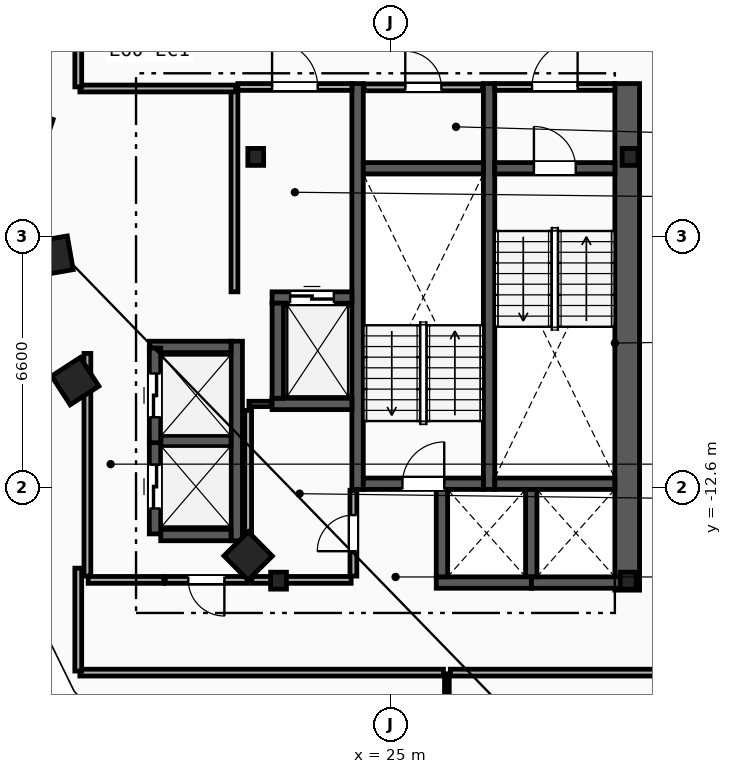
"""IFC4 building model, lengths in metres.
Left out: names, types, materials, properties, quantities, classifications, styles, units other than length and angle.
Written with IfcOpenShell. Run it as: python <this file> out.ifc"""

import sys

from ifc_helpers import new_model, si_unit, direction, frame, frame_2d, origin, origin_2d, place, context, subcontext, project, spatial, rectangle, i_section, extrude, element, fill, save


model = new_model("IFC4")
c1 = context("Model", 3, precision=1e-05, world=origin(), true_north=direction((0.0, 1.0)))
c2 = subcontext(c1, "Body", "Model", "MODEL_VIEW")
j1 = project(units=[si_unit("LENGTHUNIT", "METRE"), si_unit("PLANEANGLEUNIT", "RADIAN")], contexts=[c1])
p1 = place(None, origin())
s1 = spatial("IfcSite", under=j1, at=p1, CompositionType="ELEMENT")
p2 = place(p1, origin())
s2 = spatial("IfcBuilding", under=s1, at=p2, CompositionType="ELEMENT")
p3 = place(p2, frame((0.0, 0.0, 227.8)))
s3 = spatial("IfcBuildingStorey", under=s2, at=p3, CompositionType="ELEMENT", Elevation=227.8)
for number, where, z_axis, x_axis in (
    (1, (31.3, -3.9, 0.0), (0.0, 0.0, 1.0), (1.0, 0.0, 0.0)),
    (2, (21.45, -3.9, 0.0), (0.0, 0.0, 1.0), (1.0, 0.0, 0.0)),
    (3, (22.05, -15.05, 0.0), (0.0, 0.0, 1.0), (1.0, 0.0, 0.0)),
    (4, (31.25, -15.05, 0.0), (0.0, 0.0, 1.0), (1.0, 0.0, 0.0)),
):
    element("IfcColumn", number, at=place(p3, frame(where, z_axis=z_axis, x_axis=x_axis)), inside=s3, PredefinedType="COLUMN", context=c2, shape_type="SweptSolid", body=[
        extrude(i_section(OverallWidth=0.416, OverallDepth=0.446, WebThickness=0.039, FlangeThickness=0.063, FilletRadius=0.018, at=origin_2d()), origin(), (0.0, 0.0, 1.0), 3.6),
    ])
for number, where, z_axis, x_axis in (
    (5, (15.55, -3.2, 0.0), (0.0, 0.0, 1.0), (-0.315, -0.949, 0.0)),
    (6, (16.125, -6.5, 0.0), (0.0, 0.0, 1.0), (0.172, -0.985, 0.0)),
    (7, (16.7, -9.8, 0.0), (0.0, 0.0, 1.0), (0.544, -0.839, 0.0)),
    (8, (21.25, -14.4, 0.0), (0.0, 0.0, 1.0), (0.703, -0.711, 0.0)),
):
    element("IfcColumn", number, at=place(p3, frame(where, z_axis=z_axis, x_axis=x_axis)), inside=s3, PredefinedType="COLUMN", context=c2, shape_type="SweptSolid", body=[
        extrude(rectangle(XDim=0.9, YDim=0.9, at=origin_2d()), origin(), (0.0, 0.0, 1.0), 3.6),
    ])
p4 = place(p3, frame((31.225, -15.3, 0.0), z_axis=(0.0, 0.0, 1.0), x_axis=(0.0, 1.0, 0.0)))
e9 = element("IfcWall", 9, at=p4, inside=s3, PredefinedType="SHEAR", context=c2, shape_type="SweptSolid", body=[
    extrude(rectangle(XDim=13.33, YDim=0.65, at=frame_2d((6.665, 0.0))), origin(), (0.0, 0.0, 1.0), 3.34),
])
for number, where, z_axis, x_axis in (
    (10, (27.59, -12.65, 0.0), (0.0, 0.0, 1.0), (0.0, 1.0, 0.0)),
    (11, (24.13, -12.65, 0.0), (0.0, 0.0, 1.0), (0.0, 1.0, 0.0)),
):
    element("IfcWall", number, at=place(p3, frame(where, z_axis=z_axis, x_axis=x_axis)), inside=s3, PredefinedType="SHEAR", context=c2, shape_type="SweptSolid", body=[
        extrude(rectangle(XDim=10.68, YDim=0.3, at=frame_2d((5.34, 0.0))), origin(), (0.0, 0.0, 1.0), 3.34),
    ])
p5 = place(p3, frame((27.74, -4.2, 0.0), z_axis=(0.0, 0.0, 1.0), x_axis=(1.0, 0.0, 0.0)))
e12 = element("IfcWall", 12, at=p5, inside=s3, PredefinedType="SHEAR", context=c2, shape_type="SweptSolid", body=[
    extrude(rectangle(XDim=3.16, YDim=0.3, at=frame_2d((1.58, 0.0))), origin(), (0.0, 0.0, 1.0), 3.34),
])
p6 = place(p5, frame((1.03, 0.0, 0.0)))
e13 = element("IfcOpeningElement", 13, at=p6, cuts=e12, PredefinedType="OPENING", context=c2, shape_type="SweptSolid", body=[
    extrude(rectangle(XDim=1.1, YDim=2.15, at=frame_2d((0.55, 1.075))), frame((0.0, 0.16, 0.0), z_axis=(0.0, -1.0, 0.0), x_axis=(1.0, 0.0, 0.0)), (0.0, 0.0, 1.0), 0.32),
])
p7 = place(p3, frame((27.74, -12.5, 0.0), z_axis=(0.0, 0.0, 1.0), x_axis=(1.0, 0.0, 0.0)))
e14 = element("IfcWall", 14, at=p7, inside=s3, PredefinedType="SHEAR", context=c2, shape_type="SweptSolid", body=[
    extrude(rectangle(XDim=3.16, YDim=0.3, at=frame_2d((1.58, 0.0))), origin(), (0.0, 0.0, 1.0), 3.34),
])
p8 = place(p3, frame((24.28, -12.5, 0.0), z_axis=(0.0, 0.0, 1.0), x_axis=(1.0, 0.0, 0.0)))
e15 = element("IfcWall", 15, at=p8, inside=s3, PredefinedType="SHEAR", context=c2, shape_type="SweptSolid", body=[
    extrude(rectangle(XDim=3.16, YDim=0.3, at=frame_2d((1.58, 0.0))), origin(), (0.0, 0.0, 1.0), 3.34),
])
p9 = place(p8, frame((1.03, 0.0, 0.0)))
e16 = element("IfcOpeningElement", 16, at=p9, cuts=e15, PredefinedType="OPENING", context=c2, shape_type="SweptSolid", body=[
    extrude(rectangle(XDim=1.1, YDim=2.15, at=frame_2d((0.55, 1.075))), frame((0.0, 0.16, 0.0), z_axis=(0.0, -1.0, 0.0), x_axis=(1.0, 0.0, 0.0)), (0.0, 0.0, 1.0), 0.32),
])
p10 = place(p3, frame((24.28, -4.2, 0.0), z_axis=(0.0, 0.0, 1.0), x_axis=(1.0, 0.0, 0.0)))
e17 = element("IfcWall", 17, at=p10, inside=s3, PredefinedType="SHEAR", context=c2, shape_type="SweptSolid", body=[
    extrude(rectangle(XDim=3.16, YDim=0.3, at=frame_2d((1.58, 0.0))), origin(), (0.0, 0.0, 1.0), 3.34),
])
p11 = place(p3, frame((20.89, -7.45, 0.0), z_axis=(0.0, 0.0, 1.0), x_axis=(0.0, 1.0, 0.0)))
e18 = element("IfcWall", 18, at=p11, inside=s3, PredefinedType="PARTITIONING", context=c2, shape_type="SweptSolid", body=[
    extrude(rectangle(XDim=5.3, YDim=0.18, at=frame_2d((2.65, 0.0))), origin(), (0.0, 0.0, 1.0), 3.34),
])
p12 = place(p3, frame((20.98, -2.06, 0.0), z_axis=(0.0, 0.0, 1.0), x_axis=(1.0, 0.0, 0.0)))
e19 = element("IfcWall", 19, at=p12, inside=s3, PredefinedType="PARTITIONING", context=c2, shape_type="SweptSolid", body=[
    extrude(rectangle(XDim=3.0, YDim=0.18, at=frame_2d((1.5, 0.0))), origin(), (0.0, 0.0, 1.0), 3.34),
])
p13 = place(p12, frame((0.9, 0.0, 0.0)))
e20 = element("IfcOpeningElement", 20, at=p13, cuts=e19, PredefinedType="OPENING", context=c2, shape_type="SweptSolid", body=[
    extrude(rectangle(XDim=1.2, YDim=2.15, at=frame_2d((0.6, 1.075))), frame((0.0, 0.1, 0.0), z_axis=(0.0, -1.0, 0.0), x_axis=(1.0, 0.0, 0.0)), (0.0, 0.0, 1.0), 0.2),
])
p14 = place(p3, frame((27.74, -2.06, 0.0), z_axis=(0.0, 0.0, 1.0), x_axis=(1.0, 0.0, 0.0)))
e21 = element("IfcWall", 21, at=p14, inside=s3, PredefinedType="PARTITIONING", context=c2, shape_type="SweptSolid", body=[
    extrude(rectangle(XDim=3.16, YDim=0.18, at=frame_2d((1.58, 0.0))), origin(), (0.0, 0.0, 1.0), 3.34),
])
p15 = place(p14, frame((0.98, 0.0, 0.0)))
e22 = element("IfcOpeningElement", 22, at=p15, cuts=e21, PredefinedType="OPENING", context=c2, shape_type="SweptSolid", body=[
    extrude(rectangle(XDim=1.2, YDim=2.15, at=frame_2d((0.6, 1.075))), frame((0.0, 0.1, 0.0), z_axis=(0.0, -1.0, 0.0), x_axis=(1.0, 0.0, 0.0)), (0.0, 0.0, 1.0), 0.2),
])
p16 = place(p3, frame((21.88, -7.6, 0.0), z_axis=(0.0, 0.0, 1.0), x_axis=(1.0, 0.0, 0.0)))
e23 = element("IfcWall", 23, at=p16, inside=s3, PredefinedType="SHEAR", context=c2, shape_type="SweptSolid", body=[
    extrude(rectangle(XDim=2.1, YDim=0.3, at=frame_2d((1.05, 0.0))), origin(), (0.0, 0.0, 1.0), 3.34),
])
p17 = place(p16, frame((0.475, 0.0, 0.0)))
e24 = element("IfcOpeningElement", 24, at=p17, cuts=e23, PredefinedType="OPENING", context=c2, shape_type="SweptSolid", body=[
    extrude(rectangle(XDim=1.15, YDim=2.2, at=frame_2d((0.575, 1.1))), frame((0.0, 0.16, 0.0), z_axis=(0.0, -1.0, 0.0), x_axis=(1.0, 0.0, 0.0)), (0.0, 0.0, 1.0), 0.32),
])
p18 = place(p3, frame((21.88, -10.4, 0.0), z_axis=(0.0, 0.0, 1.0), x_axis=(1.0, 0.0, 0.0)))
e25 = element("IfcWall", 25, at=p18, inside=s3, PredefinedType="SHEAR", context=c2, shape_type="SweptSolid", body=[
    extrude(rectangle(XDim=2.1, YDim=0.3, at=frame_2d((1.05, 0.0))), origin(), (0.0, 0.0, 1.0), 3.34),
])
for number, where, z_axis, x_axis in (
    (26, (22.03, -10.25, 0.0), (0.0, 0.0, 1.0), (0.0, 1.0, 0.0)),
    (27, (28.7, -15.1, 0.0), (0.0, 0.0, 1.0), (1.0, 0.0, 0.0)),
):
    element("IfcWall", number, at=place(p3, frame(where, z_axis=z_axis, x_axis=x_axis)), inside=s3, PredefinedType="SHEAR", context=c2, shape_type="SweptSolid", body=[
        extrude(rectangle(XDim=2.5, YDim=0.3, at=frame_2d((1.25, 0.0))), origin(), (0.0, 0.0, 1.0), 3.34),
    ])
p19 = place(p3, frame((28.7, -14.95, 0.0), z_axis=(0.0, 0.0, 1.0), x_axis=(0.0, 1.0, 0.0)))
e28 = element("IfcWall", 28, at=p19, inside=s3, PredefinedType="SHEAR", context=c2, shape_type="SweptSolid", body=[
    extrude(rectangle(XDim=2.3, YDim=0.3, at=frame_2d((1.15, 0.0))), origin(), (0.0, 0.0, 1.0), 3.34),
])
p20 = place(p3, frame((26.2, -15.1, 0.0), z_axis=(0.0, 0.0, 1.0), x_axis=(1.0, 0.0, 0.0)))
e29 = element("IfcWall", 29, at=p20, inside=s3, PredefinedType="SHEAR", context=c2, shape_type="SweptSolid", body=[
    extrude(rectangle(XDim=2.5, YDim=0.3, at=frame_2d((1.25, 0.0))), origin(), (0.0, 0.0, 1.0), 3.34),
])
p21 = place(p3, frame((26.35, -14.95, 0.0), z_axis=(0.0, 0.0, 1.0), x_axis=(0.0, 1.0, 0.0)))
e30 = element("IfcWall", 30, at=p21, inside=s3, PredefinedType="SHEAR", context=c2, shape_type="SweptSolid", body=[
    extrude(rectangle(XDim=2.3, YDim=0.3, at=frame_2d((1.15, 0.0))), origin(), (0.0, 0.0, 1.0), 3.34),
])
p22 = place(p3, frame((20.95, -14.0, 0.0), z_axis=(0.0, 0.0, 1.0), x_axis=(0.0, 1.0, 0.0)))
e31 = element("IfcWall", 31, at=p22, inside=s3, PredefinedType="SHEAR", context=c2, shape_type="SweptSolid", body=[
    extrude(rectangle(XDim=5.25, YDim=0.3, at=frame_2d((2.625, 0.0))), origin(), (0.0, 0.0, 1.0), 3.34),
])
p23 = place(p3, frame((18.95, -13.85, 0.0), z_axis=(0.0, 0.0, 1.0), x_axis=(1.0, 0.0, 0.0)))
e32 = element("IfcWall", 32, at=p23, inside=s3, PredefinedType="SHEAR", context=c2, shape_type="SweptSolid", body=[
    extrude(rectangle(XDim=1.85, YDim=0.3, at=frame_2d((0.925, 0.0))), origin(), (0.0, 0.0, 1.0), 3.34),
])
p24 = place(p3, frame((18.65, -8.9, 0.0), z_axis=(0.0, 0.0, 1.0), x_axis=(1.0, 0.0, 0.0)))
e33 = element("IfcWall", 33, at=p24, inside=s3, PredefinedType="SHEAR", context=c2, shape_type="SweptSolid", body=[
    extrude(rectangle(XDim=2.15, YDim=0.3, at=frame_2d((1.075, 0.0))), origin(), (0.0, 0.0, 1.0), 3.34),
])
p25 = place(p3, frame((18.95, -11.375, 0.0), z_axis=(0.0, 0.0, 1.0), x_axis=(1.0, 0.0, 0.0)))
e34 = element("IfcWall", 34, at=p25, inside=s3, PredefinedType="SHEAR", context=c2, shape_type="SweptSolid", body=[
    extrude(rectangle(XDim=1.85, YDim=0.3, at=frame_2d((0.925, 0.0))), origin(), (0.0, 0.0, 1.0), 3.34),
])
p26 = place(p3, frame((18.8, -13.82, 0.0), z_axis=(0.0, 0.0, 1.0), x_axis=(0.0, 1.0, 0.0)))
e35 = element("IfcWall", 35, at=p26, inside=s3, PredefinedType="SHEAR", context=c2, shape_type="SweptSolid", body=[
    extrude(rectangle(XDim=2.49, YDim=0.3, at=frame_2d((1.245, 0.0))), origin(), (0.0, 0.0, 1.0), 3.34),
])
p27 = place(p26, frame((0.67, 0.0, 0.0)))
e36 = element("IfcOpeningElement", 36, at=p27, cuts=e35, PredefinedType="OPENING", context=c2, shape_type="SweptSolid", body=[
    extrude(rectangle(XDim=1.15, YDim=2.2, at=frame_2d((0.575, 1.1))), frame((0.0, 0.16, 0.0), z_axis=(0.0, -1.0, 0.0), x_axis=(1.0, 0.0, 0.0)), (0.0, 0.0, 1.0), 0.32),
])
p28 = place(p3, frame((18.8, -11.42, 0.0), z_axis=(0.0, 0.0, 1.0), x_axis=(0.0, 1.0, 0.0)))
e37 = element("IfcWall", 37, at=p28, inside=s3, PredefinedType="SHEAR", context=c2, shape_type="SweptSolid", body=[
    extrude(rectangle(XDim=2.49, YDim=0.3, at=frame_2d((1.245, 0.0))), origin(), (0.0, 0.0, 1.0), 3.34),
])
p29 = place(p28, frame((0.67, 0.0, 0.0)))
e38 = element("IfcOpeningElement", 38, at=p29, cuts=e37, PredefinedType="OPENING", context=c2, shape_type="SweptSolid", body=[
    extrude(rectangle(XDim=1.15, YDim=2.2, at=frame_2d((0.575, 1.1))), frame((0.0, 0.16, 0.0), z_axis=(0.0, -1.0, 0.0), x_axis=(1.0, 0.0, 0.0)), (0.0, 0.0, 1.0), 0.32),
])
p30 = place(p3, frame((17.02, -14.93, 0.0), z_axis=(0.0, 0.0, 1.0), x_axis=(0.0, 1.0, 0.0)))
e39 = element("IfcWall", 39, at=p30, inside=s3, PredefinedType="PARTITIONING", context=c2, shape_type="SweptSolid", body=[
    extrude(rectangle(XDim=5.86, YDim=0.18, at=frame_2d((2.93, 0.0))), origin(), (0.0, 0.0, 1.0), 3.34),
])
p31 = place(p3, frame((17.04, -15.03, 0.0), z_axis=(0.0, 0.0, 1.0), x_axis=(1.0, 0.0, 0.0)))
e40 = element("IfcWall", 40, at=p31, inside=s3, PredefinedType="PARTITIONING", context=c2, shape_type="SweptSolid", body=[
    extrude(rectangle(XDim=1.99, YDim=0.18, at=frame_2d((0.995, 0.0))), origin(), (0.0, 0.0, 1.0), 3.34),
])
p32 = place(p3, frame((21.23, -15.03, 0.0), z_axis=(0.0, 0.0, 1.0), x_axis=(-1.0, 0.0, 0.0)))
e41 = element("IfcWall", 41, at=p32, inside=s3, PredefinedType="PARTITIONING", context=c2, shape_type="SweptSolid", body=[
    extrude(rectangle(XDim=2.16, YDim=0.18, at=frame_2d((1.08, 0.0))), origin(), (0.0, 0.0, 1.0), 3.34),
])
p33 = place(p32, frame((0.605, 0.0, 0.0)))
e42 = element("IfcOpeningElement", 42, at=p33, cuts=e41, PredefinedType="OPENING", context=c2, shape_type="SweptSolid", body=[
    extrude(rectangle(XDim=0.95, YDim=2.1, at=frame_2d((0.475, 1.05))), frame((0.0, 0.1, 0.0), z_axis=(0.0, -1.0, 0.0), x_axis=(1.0, 0.0, 0.0)), (0.0, 0.0, 1.0), 0.2),
])
p34 = place(p3, frame((21.27, -10.4, 0.0), z_axis=(0.0, 0.0, 1.0), x_axis=(1.0, 0.0, 0.0)))
e43 = element("IfcWall", 43, at=p34, inside=s3, PredefinedType="PARTITIONING", context=c2, shape_type="SweptSolid", body=[
    extrude(rectangle(XDim=0.59, YDim=0.14, at=frame_2d((0.295, 0.0))), origin(), (0.0, 0.0, 1.0), 3.34),
])
p35 = place(p3, frame((21.25, -14.93, 0.0), z_axis=(0.0, 0.0, 1.0), x_axis=(0.0, 1.0, 0.0)))
e44 = element("IfcWall", 44, at=p35, inside=s3, PredefinedType="PARTITIONING", context=c2, shape_type="SweptSolid", body=[
    extrude(rectangle(XDim=4.36, YDim=0.18, at=frame_2d((2.18, 0.0))), origin(), (0.0, 0.0, 1.0), 3.34),
])
p36 = place(p3, frame((21.35, -15.03, 0.0), z_axis=(0.0, 0.0, 1.0), x_axis=(1.0, 0.0, 0.0)))
e45 = element("IfcWall", 45, at=p36, inside=s3, PredefinedType="PARTITIONING", context=c2, shape_type="SweptSolid", body=[
    extrude(rectangle(XDim=2.61, YDim=0.18, at=frame_2d((1.305, 0.0))), origin(), (0.0, 0.0, 1.0), 2.413),
])
p37 = place(p3, frame((24.3, -2.07, 0.0), z_axis=(0.0, 0.0, 1.0), x_axis=(1.0, 0.0, 0.0)))
e46 = element("IfcWall", 46, at=p37, inside=s3, PredefinedType="PARTITIONING", context=c2, shape_type="SweptSolid", body=[
    extrude(rectangle(XDim=3.12, YDim=0.18, at=frame_2d((1.56, 0.0))), origin(), (0.0, 0.0, 1.0), 3.34),
])
p38 = place(p37, frame((1.085, 0.0, 0.0)))
e47 = element("IfcOpeningElement", 47, at=p38, cuts=e46, PredefinedType="OPENING", context=c2, shape_type="SweptSolid", body=[
    extrude(rectangle(XDim=0.95, YDim=2.1, at=frame_2d((0.475, 1.05))), frame((0.0, 0.1, 0.0), z_axis=(0.0, -1.0, 0.0), x_axis=(1.0, 0.0, 0.0)), (0.0, 0.0, 1.0), 0.2),
])
p39 = place(p3, frame((24.02, -14.93, 0.0), z_axis=(0.0, 0.0, 1.0), x_axis=(0.0, 1.0, 0.0)))
e48 = element("IfcWall", 48, at=p39, inside=s3, PredefinedType="PARTITIONING", context=c2, shape_type="SweptSolid", body=[
    extrude(rectangle(XDim=2.26, YDim=0.18, at=frame_2d((1.13, 0.0))), origin(), (0.0, 0.0, 1.0), 3.34),
])
p40 = place(p39, frame((0.655, 0.0, 0.0)))
e49 = element("IfcOpeningElement", 49, at=p40, cuts=e48, PredefinedType="OPENING", context=c2, shape_type="SweptSolid", body=[
    extrude(rectangle(XDim=0.95, YDim=2.1, at=frame_2d((0.475, 1.05))), frame((0.0, 0.1, 0.0), z_axis=(0.0, -1.0, 0.0), x_axis=(1.0, 0.0, 0.0)), (0.0, 0.0, 1.0), 0.2),
])
p41 = place(p3, frame((26.48, -24.461, 0.0), z_axis=(0.0, 0.0, 1.0), x_axis=(0.0, 1.0, 0.0)))
e50 = element("IfcWall", 50, at=p41, inside=s3, PredefinedType="PARTITIONING", context=c2, shape_type="SweptSolid", body=[
    extrude(rectangle(XDim=6.961, YDim=0.125, at=frame_2d((3.48, 0.0))), origin(), (0.0, 0.0, 1.0), 3.34),
])
p42 = place(p3, frame((16.822, -17.47, 0.0), z_axis=(0.0, 0.0, 1.0), x_axis=(1.0, 0.0, 0.0)))
e51 = element("IfcWall", 51, at=p42, inside=s3, PredefinedType="PARTITIONING", context=c2, shape_type="SweptSolid", body=[
    extrude(rectangle(XDim=9.568, YDim=0.18, at=frame_2d((4.784, 0.0))), origin(), (0.0, 0.0, 1.0), 3.34),
])
p43 = place(p3, frame((26.57, -17.47, 0.0), z_axis=(0.0, 0.0, 1.0), x_axis=(1.0, 0.0, 0.0)))
e52 = element("IfcWall", 52, at=p43, inside=s3, PredefinedType="PARTITIONING", context=c2, shape_type="SweptSolid", body=[
    extrude(rectangle(XDim=7.058, YDim=0.18, at=frame_2d((3.529, 0.0))), origin(), (0.0, 0.0, 1.0), 3.34),
])
p44 = place(p3, frame((16.822, -2.1, 0.0), z_axis=(0.0, 0.0, 1.0), x_axis=(1.0, 0.0, 0.0)))
e53 = element("IfcWall", 53, at=p44, inside=s3, PredefinedType="PARTITIONING", context=c2, shape_type="SweptSolid", body=[
    extrude(rectangle(XDim=4.098, YDim=0.18, at=frame_2d((2.049, 0.0))), origin(), (0.0, 0.0, 1.0), 3.34),
])
p45 = place(p3, frame((16.78, -14.721, 0.0), z_axis=(0.0, 0.0, 1.0), x_axis=(0.0, -1.0, 0.0)))
e54 = element("IfcWall", 54, at=p45, inside=s3, PredefinedType="PARTITIONING", context=c2, shape_type="SweptSolid", body=[
    extrude(rectangle(XDim=2.707, YDim=0.18, at=frame_2d((1.354, 0.0))), origin(), (0.0, 0.0, 1.0), 3.34),
])
p46 = place(p3, frame((16.78, 0.329, 0.0), z_axis=(0.0, 0.0, 1.0), x_axis=(0.0, -1.0, 0.0)))
e55 = element("IfcWall", 55, at=p46, inside=s3, PredefinedType="PARTITIONING", context=c2, shape_type="SweptSolid", body=[
    extrude(rectangle(XDim=2.387, YDim=0.18, at=frame_2d((1.194, 0.0))), origin(), (0.0, 0.0, 1.0), 3.34),
])
p47 = place(p6, origin())
e56 = element("IfcDoor", 56, at=p47, inside=s3, OperationType="SINGLE_SWING_LEFT", PredefinedType="DOOR", context=c2, shape_type="SweptSolid", body=[
    extrude(rectangle(XDim=1.1, YDim=2.15, at=frame_2d((0.55, 1.075))), frame((0.0, 0.025, 0.0), z_axis=(0.0, -1.0, 0.0), x_axis=(1.0, 0.0, 0.0)), (0.0, 0.0, 1.0), 0.05),
])
fill(e13, e56)
p48 = place(p9, origin())
e57 = element("IfcDoor", 57, at=p48, inside=s3, OperationType="SINGLE_SWING_RIGHT", PredefinedType="DOOR", context=c2, shape_type="SweptSolid", body=[
    extrude(rectangle(XDim=1.1, YDim=2.15, at=frame_2d((0.55, 1.075))), frame((0.0, 0.025, 0.0), z_axis=(0.0, -1.0, 0.0), x_axis=(1.0, 0.0, 0.0)), (0.0, 0.0, 1.0), 0.05),
])
fill(e16, e57)
p49 = place(p13, origin())
e58 = element("IfcDoor", 58, at=p49, inside=s3, OperationType="SINGLE_SWING_LEFT", PredefinedType="DOOR", context=c2, shape_type="SweptSolid", body=[
    extrude(rectangle(XDim=1.2, YDim=2.15, at=frame_2d((0.6, 1.075))), frame((0.0, 0.025, 0.0), z_axis=(0.0, -1.0, 0.0), x_axis=(1.0, 0.0, 0.0)), (0.0, 0.0, 1.0), 0.05),
])
fill(e20, e58)
p50 = place(p15, origin())
e59 = element("IfcDoor", 59, at=p50, inside=s3, OperationType="SINGLE_SWING_RIGHT", PredefinedType="DOOR", context=c2, shape_type="SweptSolid", body=[
    extrude(rectangle(XDim=1.2, YDim=2.15, at=frame_2d((0.6, 1.075))), frame((0.0, 0.025, 0.0), z_axis=(0.0, -1.0, 0.0), x_axis=(1.0, 0.0, 0.0)), (0.0, 0.0, 1.0), 0.05),
])
fill(e22, e59)
p51 = place(p17, origin())
e60 = element("IfcDoor", 60, at=p51, inside=s3, OperationType="SLIDING_TO_LEFT", PredefinedType="TRAPDOOR", context=c2, shape_type="SweptSolid", body=[
    extrude(rectangle(XDim=1.15, YDim=2.2, at=frame_2d((0.575, 1.1))), frame((0.0, 0.025, 0.0), z_axis=(0.0, -1.0, 0.0), x_axis=(1.0, 0.0, 0.0)), (0.0, 0.0, 1.0), 0.05),
])
fill(e24, e60)
p52 = place(p27, origin())
e61 = element("IfcDoor", 61, at=p52, inside=s3, OperationType="SLIDING_TO_LEFT", PredefinedType="TRAPDOOR", context=c2, shape_type="SweptSolid", body=[
    extrude(rectangle(XDim=1.15, YDim=2.2, at=frame_2d((0.575, 1.1))), frame((0.0, 0.025, 0.0), z_axis=(0.0, -1.0, 0.0), x_axis=(1.0, 0.0, 0.0)), (0.0, 0.0, 1.0), 0.05),
])
fill(e36, e61)
p53 = place(p29, origin())
e62 = element("IfcDoor", 62, at=p53, inside=s3, OperationType="SLIDING_TO_LEFT", PredefinedType="TRAPDOOR", context=c2, shape_type="SweptSolid", body=[
    extrude(rectangle(XDim=1.15, YDim=2.2, at=frame_2d((0.575, 1.1))), frame((0.0, 0.025, 0.0), z_axis=(0.0, -1.0, 0.0), x_axis=(1.0, 0.0, 0.0)), (0.0, 0.0, 1.0), 0.05),
])
fill(e38, e62)
p54 = place(p38, origin())
e63 = element("IfcDoor", 63, at=p54, inside=s3, OperationType="SINGLE_SWING_LEFT", PredefinedType="DOOR", context=c2, shape_type="SweptSolid", body=[
    extrude(rectangle(XDim=0.95, YDim=2.1, at=frame_2d((0.475, 1.05))), frame((0.0, 0.025, 0.0), z_axis=(0.0, -1.0, 0.0), x_axis=(1.0, 0.0, 0.0)), (0.0, 0.0, 1.0), 0.05),
])
fill(e47, e63)
p55 = place(p40, origin())
e64 = element("IfcDoor", 64, at=p55, inside=s3, OperationType="SINGLE_SWING_LEFT", PredefinedType="DOOR", context=c2, shape_type="SweptSolid", body=[
    extrude(rectangle(XDim=0.95, YDim=2.1, at=frame_2d((0.475, 1.05))), frame((0.0, 0.025, 0.0), z_axis=(0.0, -1.0, 0.0), x_axis=(1.0, 0.0, 0.0)), (0.0, 0.0, 1.0), 0.05),
])
fill(e49, e64)
p56 = place(p33, origin())
e65 = element("IfcDoor", 65, at=p56, inside=s3, OperationType="SINGLE_SWING_LEFT", PredefinedType="DOOR", context=c2, shape_type="SweptSolid", body=[
    extrude(rectangle(XDim=0.95, YDim=2.1, at=frame_2d((0.475, 1.05))), frame((0.0, 0.025, 0.0), z_axis=(0.0, -1.0, 0.0), x_axis=(1.0, 0.0, 0.0)), (0.0, 0.0, 1.0), 0.05),
])
fill(e42, e65)
save(model, sys.argv[1])
